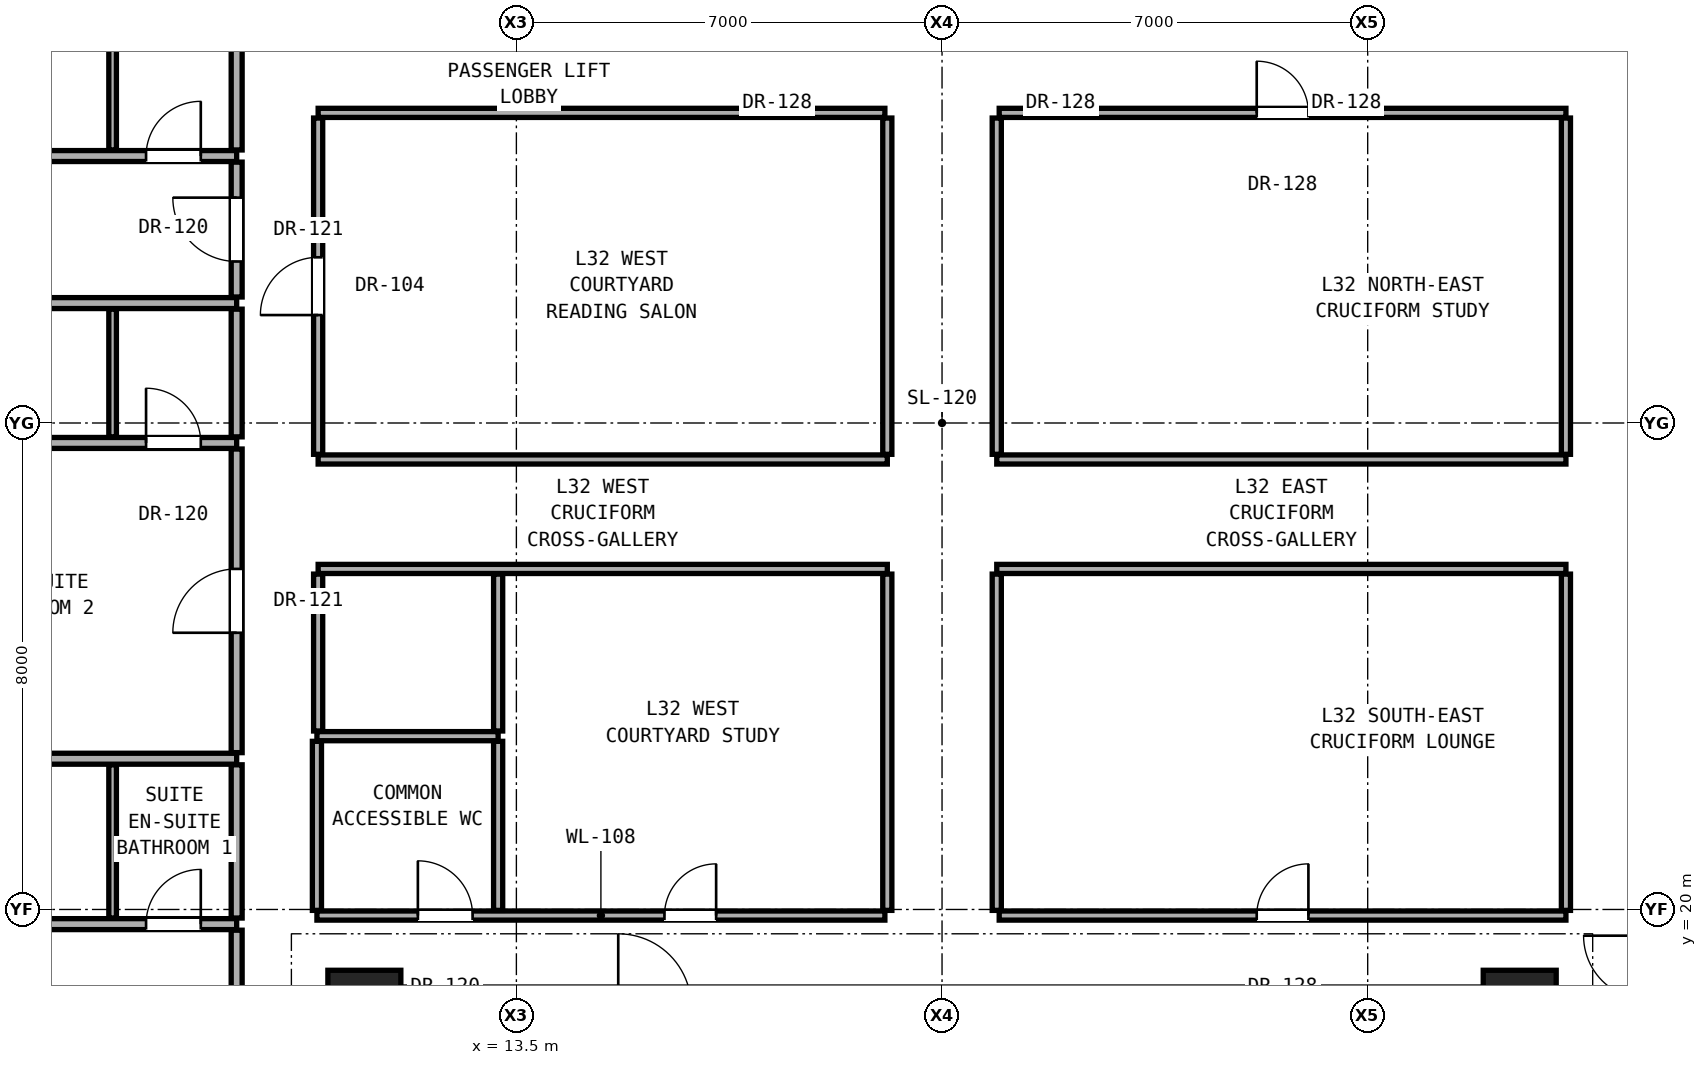
"""IFC4 building model, lengths in metres.
Left out: names, types, materials, properties, quantities, classifications, styles, units other than length and angle.
Written with IfcOpenShell. Run it as: python <this file> out.ifc"""

import sys

from ifc_helpers import new_model, si_unit, direction, frame, frame_2d, origin, origin_2d, place, context, subcontext, project, spatial, rectangle, extrude, element, fill, save


model = new_model("IFC4")
c1 = context("Model", 3, precision=1e-05, world=origin(), true_north=direction((0.0, 1.0)))
c2 = subcontext(c1, "Body", "Model", "MODEL_VIEW")
j1 = project(units=[si_unit("LENGTHUNIT", "METRE"), si_unit("PLANEANGLEUNIT", "RADIAN")], contexts=[c1])
p1 = place(None, origin())
s1 = spatial("IfcSite", under=j1, at=p1, CompositionType="ELEMENT")
p2 = place(p1, origin())
s2 = spatial("IfcBuilding", under=s1, at=p2, CompositionType="ELEMENT")
p3 = place(p2, frame((0.0, 0.0, 114.8)))
s3 = spatial("IfcBuildingStorey", under=s2, at=p3, CompositionType="ELEMENT", Elevation=114.8)
for number, where, z_axis, x_axis in (
    (1, (11.0, 18.4, 0.0), (0.0, 0.0, 1.0), (1.0, 0.0, 0.0)),
    (2, (30.0, 18.4, 0.0), (0.0, 0.0, 1.0), (1.0, 0.0, 0.0)),
):
    element("IfcColumn", number, at=place(p3, frame(where, z_axis=z_axis, x_axis=x_axis)), inside=s3, PredefinedType="COLUMN", context=c2, shape_type="SweptSolid", body=[
        extrude(rectangle(XDim=1.2, YDim=1.2, at=origin_2d()), origin(), (0.0, 0.0, 1.0), 3.3),
    ])
p4 = place(p3, frame((-1.97, 19.759, 0.0), z_axis=(0.0, 0.0, 1.0), x_axis=(1.0, 0.0, 0.0)))
e3 = element("IfcWall", 3, at=p4, inside=s3, PredefinedType="PARTITIONING", context=c2, shape_type="SweptSolid", body=[
    extrude(rectangle(XDim=10.87, YDim=0.18, at=frame_2d((5.435, 0.0))), origin(), (0.0, 0.0, 1.0), 2.145),
])
p5 = place(p4, frame((4.96, 0.0, 0.0)))
e4 = element("IfcOpeningElement", 4, at=p5, cuts=e3, PredefinedType="OPENING", context=c2, shape_type="SweptSolid", body=[
    extrude(rectangle(XDim=0.85, YDim=2.01, at=frame_2d((0.425, 1.005))), frame((0.0, 0.1, 0.0), z_axis=(0.0, -1.0, 0.0), x_axis=(1.0, 0.0, 0.0)), (0.0, 0.0, 1.0), 0.2),
])
p6 = place(p4, frame((9.38, 0.0, 0.0)))
e5 = element("IfcOpeningElement", 5, at=p6, cuts=e3, PredefinedType="OPENING", context=c2, shape_type="SweptSolid", body=[
    extrude(rectangle(XDim=0.9, YDim=2.1, at=frame_2d((0.45, 1.05))), frame((0.0, 0.1, 0.0), z_axis=(0.0, -1.0, 0.0), x_axis=(1.0, 0.0, 0.0)), (0.0, 0.0, 1.0), 0.2),
])
p7 = place(p3, frame((10.22, 19.9, 0.0), z_axis=(0.0, 0.0, 1.0), x_axis=(1.0, 0.0, 0.0)))
e6 = element("IfcWall", 6, at=p7, inside=s3, PredefinedType="PARTITIONING", context=c2, shape_type="SweptSolid", body=[
    extrude(rectangle(XDim=9.34, YDim=0.15, at=frame_2d((4.67, 0.0))), origin(), (0.0, 0.0, 1.0), 2.124),
])
p8 = place(p7, frame((1.66, 0.0, 0.0)))
e7 = element("IfcOpeningElement", 7, at=p8, cuts=e6, PredefinedType="OPENING", context=c2, shape_type="SweptSolid", body=[
    extrude(rectangle(XDim=0.9, YDim=2.1, at=frame_2d((0.45, 1.05))), frame((0.0, 0.085, 0.0), z_axis=(0.0, -1.0, 0.0), x_axis=(1.0, 0.0, 0.0)), (0.0, 0.0, 1.0), 0.17),
])
p9 = place(p7, frame((5.715, 0.0, 0.0)))
e8 = element("IfcOpeningElement", 8, at=p9, cuts=e6, PredefinedType="OPENING", context=c2, shape_type="SweptSolid", body=[
    extrude(rectangle(XDim=0.85, YDim=2.01, at=frame_2d((0.425, 1.005))), frame((0.0, 0.085, 0.0), z_axis=(0.0, -1.0, 0.0), x_axis=(1.0, 0.0, 0.0)), (0.0, 0.0, 1.0), 0.17),
])
p10 = place(p3, frame((21.44, 19.9, 0.0), z_axis=(0.0, 0.0, 1.0), x_axis=(1.0, 0.0, 0.0)))
e9 = element("IfcWall", 9, at=p10, inside=s3, PredefinedType="PARTITIONING", context=c2, shape_type="SweptSolid", body=[
    extrude(rectangle(XDim=9.32, YDim=0.15, at=frame_2d((4.66, 0.0))), origin(), (0.0, 0.0, 1.0), 2.124),
])
p11 = place(p10, frame((4.235, 0.0, 0.0)))
e10 = element("IfcOpeningElement", 10, at=p11, cuts=e9, PredefinedType="OPENING", context=c2, shape_type="SweptSolid", body=[
    extrude(rectangle(XDim=0.85, YDim=2.01, at=frame_2d((0.425, 1.005))), frame((0.0, 0.085, 0.0), z_axis=(0.0, -1.0, 0.0), x_axis=(1.0, 0.0, 0.0)), (0.0, 0.0, 1.0), 0.17),
])
p12 = place(p3, frame((-1.97, 22.479, 0.0), z_axis=(0.0, 0.0, 1.0), x_axis=(1.0, 0.0, 0.0)))
e11 = element("IfcWall", 11, at=p12, inside=s3, PredefinedType="PARTITIONING", context=c2, shape_type="SweptSolid", body=[
    extrude(rectangle(XDim=10.87, YDim=0.18, at=frame_2d((5.435, 0.0))), origin(), (0.0, 0.0, 1.0), 2.145),
])
p13 = place(p3, frame((10.22, 22.85, 0.0), z_axis=(0.0, 0.0, 1.0), x_axis=(1.0, 0.0, 0.0)))
e12 = element("IfcWall", 12, at=p13, inside=s3, PredefinedType="PARTITIONING", context=c2, shape_type="SweptSolid", body=[
    extrude(rectangle(XDim=2.98, YDim=0.15, at=frame_2d((1.49, 0.0))), origin(), (0.0, 0.0, 1.0), 2.124),
])
for number, where, z_axis, x_axis in (
    (13, (10.24, 25.6, 0.0), (0.0, 0.0, 1.0), (1.0, 0.0, 0.0)),
    (14, (21.4, 25.6, 0.0), (0.0, 0.0, 1.0), (1.0, 0.0, 0.0)),
    (15, (10.24, 27.4, 0.0), (0.0, 0.0, 1.0), (1.0, 0.0, 0.0)),
    (16, (21.4, 27.4, 0.0), (0.0, 0.0, 1.0), (1.0, 0.0, 0.0)),
):
    element("IfcWall", number, at=place(p3, frame(where, z_axis=z_axis, x_axis=x_axis)), inside=s3, PredefinedType="PARTITIONING", context=c2, shape_type="SweptSolid", body=[
        extrude(rectangle(XDim=9.36, YDim=0.15, at=frame_2d((4.68, 0.0))), origin(), (0.0, 0.0, 1.0), 2.124),
    ])
p14 = place(p3, frame((-1.97, 27.672, 0.0), z_axis=(0.0, 0.0, 1.0), x_axis=(1.0, 0.0, 0.0)))
e17 = element("IfcWall", 17, at=p14, inside=s3, PredefinedType="PARTITIONING", context=c2, shape_type="SweptSolid", body=[
    extrude(rectangle(XDim=10.87, YDim=0.18, at=frame_2d((5.435, 0.0))), origin(), (0.0, 0.0, 1.0), 2.145),
])
p15 = place(p14, frame((4.01, 0.0, 0.0)))
e18 = element("IfcOpeningElement", 18, at=p15, cuts=e17, PredefinedType="OPENING", context=c2, shape_type="SweptSolid", body=[
    extrude(rectangle(XDim=0.85, YDim=2.01, at=frame_2d((0.425, 1.005))), frame((0.0, 0.1, 0.0), z_axis=(0.0, -1.0, 0.0), x_axis=(1.0, 0.0, 0.0)), (0.0, 0.0, 1.0), 0.2),
])
p16 = place(p14, frame((9.38, 0.0, 0.0)))
e19 = element("IfcOpeningElement", 19, at=p16, cuts=e17, PredefinedType="OPENING", context=c2, shape_type="SweptSolid", body=[
    extrude(rectangle(XDim=0.9, YDim=2.1, at=frame_2d((0.45, 1.05))), frame((0.0, 0.1, 0.0), z_axis=(0.0, -1.0, 0.0), x_axis=(1.0, 0.0, 0.0)), (0.0, 0.0, 1.0), 0.2),
])
p17 = place(p3, frame((-1.97, 29.972, 0.0), z_axis=(0.0, 0.0, 1.0), x_axis=(1.0, 0.0, 0.0)))
e20 = element("IfcWall", 20, at=p17, inside=s3, PredefinedType="PARTITIONING", context=c2, shape_type="SweptSolid", body=[
    extrude(rectangle(XDim=10.87, YDim=0.18, at=frame_2d((5.435, 0.0))), origin(), (0.0, 0.0, 1.0), 2.145),
])
p18 = place(p3, frame((-1.97, 32.39, 0.0), z_axis=(0.0, 0.0, 1.0), x_axis=(1.0, 0.0, 0.0)))
e21 = element("IfcWall", 21, at=p18, inside=s3, PredefinedType="PARTITIONING", context=c2, shape_type="SweptSolid", body=[
    extrude(rectangle(XDim=10.87, YDim=0.18, at=frame_2d((5.435, 0.0))), origin(), (0.0, 0.0, 1.0), 2.145),
])
p19 = place(p18, frame((4.96, 0.0, 0.0)))
e22 = element("IfcOpeningElement", 22, at=p19, cuts=e21, PredefinedType="OPENING", context=c2, shape_type="SweptSolid", body=[
    extrude(rectangle(XDim=0.85, YDim=2.01, at=frame_2d((0.425, 1.005))), frame((0.0, 0.1, 0.0), z_axis=(0.0, -1.0, 0.0), x_axis=(1.0, 0.0, 0.0)), (0.0, 0.0, 1.0), 0.2),
])
p20 = place(p18, frame((9.38, 0.0, 0.0)))
e23 = element("IfcOpeningElement", 23, at=p20, cuts=e21, PredefinedType="OPENING", context=c2, shape_type="SweptSolid", body=[
    extrude(rectangle(XDim=0.9, YDim=2.1, at=frame_2d((0.45, 1.05))), frame((0.0, 0.1, 0.0), z_axis=(0.0, -1.0, 0.0), x_axis=(1.0, 0.0, 0.0)), (0.0, 0.0, 1.0), 0.2),
])
p21 = place(p3, frame((10.24, 33.1, 0.0), z_axis=(0.0, 0.0, 1.0), x_axis=(1.0, 0.0, 0.0)))
e24 = element("IfcWall", 24, at=p21, inside=s3, PredefinedType="PARTITIONING", context=c2, shape_type="SweptSolid", body=[
    extrude(rectangle(XDim=9.32, YDim=0.15, at=frame_2d((4.66, 0.0))), origin(), (0.0, 0.0, 1.0), 2.124),
])
p22 = place(p3, frame((21.44, 33.1, 0.0), z_axis=(0.0, 0.0, 1.0), x_axis=(1.0, 0.0, 0.0)))
e25 = element("IfcWall", 25, at=p22, inside=s3, PredefinedType="PARTITIONING", context=c2, shape_type="SweptSolid", body=[
    extrude(rectangle(XDim=9.32, YDim=0.15, at=frame_2d((4.66, 0.0))), origin(), (0.0, 0.0, 1.0), 2.124),
])
p23 = place(p22, frame((4.235, 0.0, 0.0)))
e26 = element("IfcOpeningElement", 26, at=p23, cuts=e25, PredefinedType="OPENING", context=c2, shape_type="SweptSolid", body=[
    extrude(rectangle(XDim=0.85, YDim=2.01, at=frame_2d((0.425, 1.005))), frame((0.0, 0.085, 0.0), z_axis=(0.0, -1.0, 0.0), x_axis=(1.0, 0.0, 0.0)), (0.0, 0.0, 1.0), 0.17),
])
p24 = place(p3, frame((6.86, 19.859, 0.0), z_axis=(0.0, 0.0, 1.0), x_axis=(0.0, 1.0, 0.0)))
e27 = element("IfcWall", 27, at=p24, inside=s3, PredefinedType="PARTITIONING", context=c2, shape_type="SweptSolid", body=[
    extrude(rectangle(XDim=2.52, YDim=0.125, at=frame_2d((1.26, 0.0))), origin(), (0.0, 0.0, 1.0), 3.08),
])
p25 = place(p3, frame((6.86, 27.772, 0.0), z_axis=(0.0, 0.0, 1.0), x_axis=(0.0, 1.0, 0.0)))
e28 = element("IfcWall", 28, at=p25, inside=s3, PredefinedType="PARTITIONING", context=c2, shape_type="SweptSolid", body=[
    extrude(rectangle(XDim=2.1, YDim=0.125, at=frame_2d((1.05, 0.0))), origin(), (0.0, 0.0, 1.0), 3.08),
])
p26 = place(p3, frame((6.86, 32.49, 0.0), z_axis=(0.0, 0.0, 1.0), x_axis=(0.0, 1.0, 0.0)))
e29 = element("IfcWall", 29, at=p26, inside=s3, PredefinedType="PARTITIONING", context=c2, shape_type="SweptSolid", body=[
    extrude(rectangle(XDim=1.748, YDim=0.125, at=frame_2d((0.874, 0.0))), origin(), (0.0, 0.0, 1.0), 3.08),
])
p27 = place(p3, frame((8.9, 14.091, 0.0), z_axis=(0.0, 0.0, 1.0), x_axis=(0.0, 1.0, 0.0)))
e30 = element("IfcWall", 30, at=p27, inside=s3, PredefinedType="PARTITIONING", context=c2, shape_type="SweptSolid", body=[
    extrude(rectangle(XDim=5.568, YDim=0.18, at=frame_2d((2.784, 0.0))), origin(), (0.0, 0.0, 1.0), 2.456),
])
p28 = place(p27, frame((2.859, 0.0, 0.0)))
e31 = element("IfcOpeningElement", 31, at=p28, cuts=e30, PredefinedType="OPENING", context=c2, shape_type="SweptSolid", body=[
    extrude(rectangle(XDim=1.05, YDim=2.2, at=frame_2d((0.525, 1.1))), frame((0.0, 0.1, 0.0), z_axis=(0.0, -1.0, 0.0), x_axis=(1.0, 0.0, 0.0)), (0.0, 0.0, 1.0), 0.2),
])
p29 = place(p3, frame((8.9, 19.859, 0.0), z_axis=(0.0, 0.0, 1.0), x_axis=(0.0, 1.0, 0.0)))
e32 = element("IfcWall", 32, at=p29, inside=s3, PredefinedType="PARTITIONING", context=c2, shape_type="SweptSolid", body=[
    extrude(rectangle(XDim=2.52, YDim=0.18, at=frame_2d((1.26, 0.0))), origin(), (0.0, 0.0, 1.0), 3.08),
])
p30 = place(p3, frame((8.9, 22.579, 0.0), z_axis=(0.0, 0.0, 1.0), x_axis=(0.0, 1.0, 0.0)))
e33 = element("IfcWall", 33, at=p30, inside=s3, PredefinedType="PARTITIONING", context=c2, shape_type="SweptSolid", body=[
    extrude(rectangle(XDim=4.993, YDim=0.18, at=frame_2d((2.497, 0.0))), origin(), (0.0, 0.0, 1.0), 2.299),
])
p31 = place(p30, frame((1.971, 0.0, 0.0)))
e34 = element("IfcOpeningElement", 34, at=p31, cuts=e33, PredefinedType="OPENING", context=c2, shape_type="SweptSolid", body=[
    extrude(rectangle(XDim=1.05, YDim=2.2, at=frame_2d((0.525, 1.1))), frame((0.0, 0.1, 0.0), z_axis=(0.0, -1.0, 0.0), x_axis=(1.0, 0.0, 0.0)), (0.0, 0.0, 1.0), 0.2),
])
p32 = place(p3, frame((8.9, 27.772, 0.0), z_axis=(0.0, 0.0, 1.0), x_axis=(0.0, 1.0, 0.0)))
e35 = element("IfcWall", 35, at=p32, inside=s3, PredefinedType="PARTITIONING", context=c2, shape_type="SweptSolid", body=[
    extrude(rectangle(XDim=2.1, YDim=0.18, at=frame_2d((1.05, 0.0))), origin(), (0.0, 0.0, 1.0), 3.08),
])
p33 = place(p3, frame((8.9, 30.072, 0.0), z_axis=(0.0, 0.0, 1.0), x_axis=(0.0, 1.0, 0.0)))
e36 = element("IfcWall", 36, at=p33, inside=s3, PredefinedType="PARTITIONING", context=c2, shape_type="SweptSolid", body=[
    extrude(rectangle(XDim=2.218, YDim=0.18, at=frame_2d((1.109, 0.0))), origin(), (0.0, 0.0, 1.0), 2.299),
])
p34 = place(p33, frame((0.584, 0.0, 0.0)))
e37 = element("IfcOpeningElement", 37, at=p34, cuts=e36, PredefinedType="OPENING", context=c2, shape_type="SweptSolid", body=[
    extrude(rectangle(XDim=1.05, YDim=2.2, at=frame_2d((0.525, 1.1))), frame((0.0, 0.1, 0.0), z_axis=(0.0, -1.0, 0.0), x_axis=(1.0, 0.0, 0.0)), (0.0, 0.0, 1.0), 0.2),
])
p35 = place(p3, frame((8.9, 32.49, 0.0), z_axis=(0.0, 0.0, 1.0), x_axis=(0.0, 1.0, 0.0)))
e38 = element("IfcWall", 38, at=p35, inside=s3, PredefinedType="PARTITIONING", context=c2, shape_type="SweptSolid", body=[
    extrude(rectangle(XDim=1.748, YDim=0.18, at=frame_2d((0.874, 0.0))), origin(), (0.0, 0.0, 1.0), 3.08),
])
p36 = place(p3, frame((10.22, 19.985, 0.0), z_axis=(0.0, 0.0, 1.0), x_axis=(0.0, 1.0, 0.0)))
e39 = element("IfcWall", 39, at=p36, inside=s3, PredefinedType="PARTITIONING", context=c2, shape_type="SweptSolid", body=[
    extrude(rectangle(XDim=2.78, YDim=0.15, at=frame_2d((1.39, 0.0))), origin(), (0.0, 0.0, 1.0), 3.08),
])
p37 = place(p3, frame((10.24, 22.935, 0.0), z_axis=(0.0, 0.0, 1.0), x_axis=(0.0, 1.0, 0.0)))
e40 = element("IfcWall", 40, at=p37, inside=s3, PredefinedType="PARTITIONING", context=c2, shape_type="SweptSolid", body=[
    extrude(rectangle(XDim=2.58, YDim=0.15, at=frame_2d((1.29, 0.0))), origin(), (0.0, 0.0, 1.0), 2.299),
])
p38 = place(p3, frame((10.24, 27.485, 0.0), z_axis=(0.0, 0.0, 1.0), x_axis=(0.0, 1.0, 0.0)))
e41 = element("IfcWall", 41, at=p38, inside=s3, PredefinedType="PARTITIONING", context=c2, shape_type="SweptSolid", body=[
    extrude(rectangle(XDim=5.53, YDim=0.15, at=frame_2d((2.765, 0.0))), origin(), (0.0, 0.0, 1.0), 2.299),
])
p39 = place(p38, frame((2.29, 0.0, 0.0)))
e42 = element("IfcOpeningElement", 42, at=p39, cuts=e41, PredefinedType="OPENING", context=c2, shape_type="SweptSolid", body=[
    extrude(rectangle(XDim=0.95, YDim=2.15, at=frame_2d((0.475, 1.075))), frame((0.0, 0.085, 0.0), z_axis=(0.0, -1.0, 0.0), x_axis=(1.0, 0.0, 0.0)), (0.0, 0.0, 1.0), 0.17),
])
p40 = place(p3, frame((13.2, 19.985, 0.0), z_axis=(0.0, 0.0, 1.0), x_axis=(0.0, 1.0, 0.0)))
e43 = element("IfcWall", 43, at=p40, inside=s3, PredefinedType="PARTITIONING", context=c2, shape_type="SweptSolid", body=[
    extrude(rectangle(XDim=2.78, YDim=0.15, at=frame_2d((1.39, 0.0))), origin(), (0.0, 0.0, 1.0), 3.08),
])
p41 = place(p3, frame((13.2, 22.935, 0.0), z_axis=(0.0, 0.0, 1.0), x_axis=(0.0, 1.0, 0.0)))
e44 = element("IfcWall", 44, at=p41, inside=s3, PredefinedType="PARTITIONING", context=c2, shape_type="SweptSolid", body=[
    extrude(rectangle(XDim=2.58, YDim=0.15, at=frame_2d((1.29, 0.0))), origin(), (0.0, 0.0, 1.0), 2.124),
])
for number, where, z_axis, x_axis in (
    (45, (19.6, 19.985, 0.0), (0.0, 0.0, 1.0), (0.0, 1.0, 0.0)),
    (46, (19.6, 27.485, 0.0), (0.0, 0.0, 1.0), (0.0, 1.0, 0.0)),
    (47, (21.4, 19.985, 0.0), (0.0, 0.0, 1.0), (0.0, 1.0, 0.0)),
    (48, (21.4, 27.485, 0.0), (0.0, 0.0, 1.0), (0.0, 1.0, 0.0)),
):
    element("IfcWall", number, at=place(p3, frame(where, z_axis=z_axis, x_axis=x_axis)), inside=s3, PredefinedType="PARTITIONING", context=c2, shape_type="SweptSolid", body=[
        extrude(rectangle(XDim=5.53, YDim=0.15, at=frame_2d((2.765, 0.0))), origin(), (0.0, 0.0, 1.0), 2.124),
    ])
for number, where, z_axis, x_axis in (
    (49, (30.76, 19.985, 0.0), (0.0, 0.0, 1.0), (0.0, 1.0, 0.0)),
    (50, (30.76, 27.485, 0.0), (0.0, 0.0, 1.0), (0.0, 1.0, 0.0)),
):
    element("IfcWall", number, at=place(p3, frame(where, z_axis=z_axis, x_axis=x_axis)), inside=s3, PredefinedType="PARTITIONING", context=c2, shape_type="SweptSolid", body=[
        extrude(rectangle(XDim=5.53, YDim=0.15, at=frame_2d((2.765, 0.0))), origin(), (0.0, 0.0, 1.0), 2.299),
    ])
p42 = place(p8, origin())
e51 = element("IfcDoor", 51, at=p42, inside=s3, OperationType="SINGLE_SWING_LEFT", PredefinedType="DOOR", context=c2, shape_type="SweptSolid", body=[
    extrude(rectangle(XDim=0.9, YDim=2.1, at=frame_2d((0.45, 1.05))), frame((0.0, 0.025, 0.0), z_axis=(0.0, -1.0, 0.0), x_axis=(1.0, 0.0, 0.0)), (0.0, 0.0, 1.0), 0.05),
])
fill(e7, e51)
p43 = place(p6, origin())
e52 = element("IfcDoor", 52, at=p43, inside=s3, OperationType="SINGLE_SWING_RIGHT", PredefinedType="DOOR", context=c2, shape_type="SweptSolid", body=[
    extrude(rectangle(XDim=0.9, YDim=2.1, at=frame_2d((0.45, 1.05))), frame((0.0, 0.025, 0.0), z_axis=(0.0, -1.0, 0.0), x_axis=(1.0, 0.0, 0.0)), (0.0, 0.0, 1.0), 0.05),
])
fill(e5, e52)
p44 = place(p31, origin())
e53 = element("IfcDoor", 53, at=p44, inside=s3, OperationType="SINGLE_SWING_LEFT", PredefinedType="DOOR", context=c2, shape_type="SweptSolid", body=[
    extrude(rectangle(XDim=1.05, YDim=2.2, at=frame_2d((0.525, 1.1))), frame((0.0, 0.025, 0.0), z_axis=(0.0, -1.0, 0.0), x_axis=(1.0, 0.0, 0.0)), (0.0, 0.0, 1.0), 0.05),
])
fill(e34, e53)
p45 = place(p16, origin())
e54 = element("IfcDoor", 54, at=p45, inside=s3, OperationType="SINGLE_SWING_LEFT", PredefinedType="DOOR", context=c2, shape_type="SweptSolid", body=[
    extrude(rectangle(XDim=0.9, YDim=2.1, at=frame_2d((0.45, 1.05))), frame((0.0, 0.025, 0.0), z_axis=(0.0, -1.0, 0.0), x_axis=(1.0, 0.0, 0.0)), (0.0, 0.0, 1.0), 0.05),
])
fill(e19, e54)
p46 = place(p34, origin())
e55 = element("IfcDoor", 55, at=p46, inside=s3, OperationType="SINGLE_SWING_RIGHT", PredefinedType="DOOR", context=c2, shape_type="SweptSolid", body=[
    extrude(rectangle(XDim=1.05, YDim=2.2, at=frame_2d((0.525, 1.1))), frame((0.0, 0.025, 0.0), z_axis=(0.0, -1.0, 0.0), x_axis=(1.0, 0.0, 0.0)), (0.0, 0.0, 1.0), 0.05),
])
fill(e37, e55)
p47 = place(p20, origin())
e56 = element("IfcDoor", 56, at=p47, inside=s3, OperationType="SINGLE_SWING_RIGHT", PredefinedType="DOOR", context=c2, shape_type="SweptSolid", body=[
    extrude(rectangle(XDim=0.9, YDim=2.1, at=frame_2d((0.45, 1.05))), frame((0.0, 0.025, 0.0), z_axis=(0.0, -1.0, 0.0), x_axis=(1.0, 0.0, 0.0)), (0.0, 0.0, 1.0), 0.05),
])
fill(e23, e56)
p48 = place(p9, origin())
e57 = element("IfcDoor", 57, at=p48, inside=s3, OperationType="SINGLE_SWING_RIGHT", PredefinedType="DOOR", context=c2, shape_type="SweptSolid", body=[
    extrude(rectangle(XDim=0.85, YDim=2.01, at=frame_2d((0.425, 1.005))), frame((0.0, 0.025, 0.0), z_axis=(0.0, -1.0, 0.0), x_axis=(1.0, 0.0, 0.0)), (0.0, 0.0, 1.0), 0.05),
])
fill(e8, e57)
p49 = place(p39, origin())
e58 = element("IfcDoor", 58, at=p49, inside=s3, OperationType="SINGLE_SWING_LEFT", PredefinedType="DOOR", context=c2, shape_type="SweptSolid", body=[
    extrude(rectangle(XDim=0.95, YDim=2.15, at=frame_2d((0.475, 1.075))), frame((0.0, 0.025, 0.0), z_axis=(0.0, -1.0, 0.0), x_axis=(1.0, 0.0, 0.0)), (0.0, 0.0, 1.0), 0.05),
])
fill(e42, e58)
p50 = place(p11, origin())
e59 = element("IfcDoor", 59, at=p50, inside=s3, OperationType="SINGLE_SWING_RIGHT", PredefinedType="DOOR", context=c2, shape_type="SweptSolid", body=[
    extrude(rectangle(XDim=0.85, YDim=2.01, at=frame_2d((0.425, 1.005))), frame((0.0, 0.025, 0.0), z_axis=(0.0, -1.0, 0.0), x_axis=(1.0, 0.0, 0.0)), (0.0, 0.0, 1.0), 0.05),
])
fill(e10, e59)
p51 = place(p23, origin())
e60 = element("IfcDoor", 60, at=p51, inside=s3, OperationType="SINGLE_SWING_LEFT", PredefinedType="DOOR", context=c2, shape_type="SweptSolid", body=[
    extrude(rectangle(XDim=0.85, YDim=2.01, at=frame_2d((0.425, 1.005))), frame((0.0, 0.025, 0.0), z_axis=(0.0, -1.0, 0.0), x_axis=(1.0, 0.0, 0.0)), (0.0, 0.0, 1.0), 0.05),
])
fill(e26, e60)
save(model, sys.argv[1])
